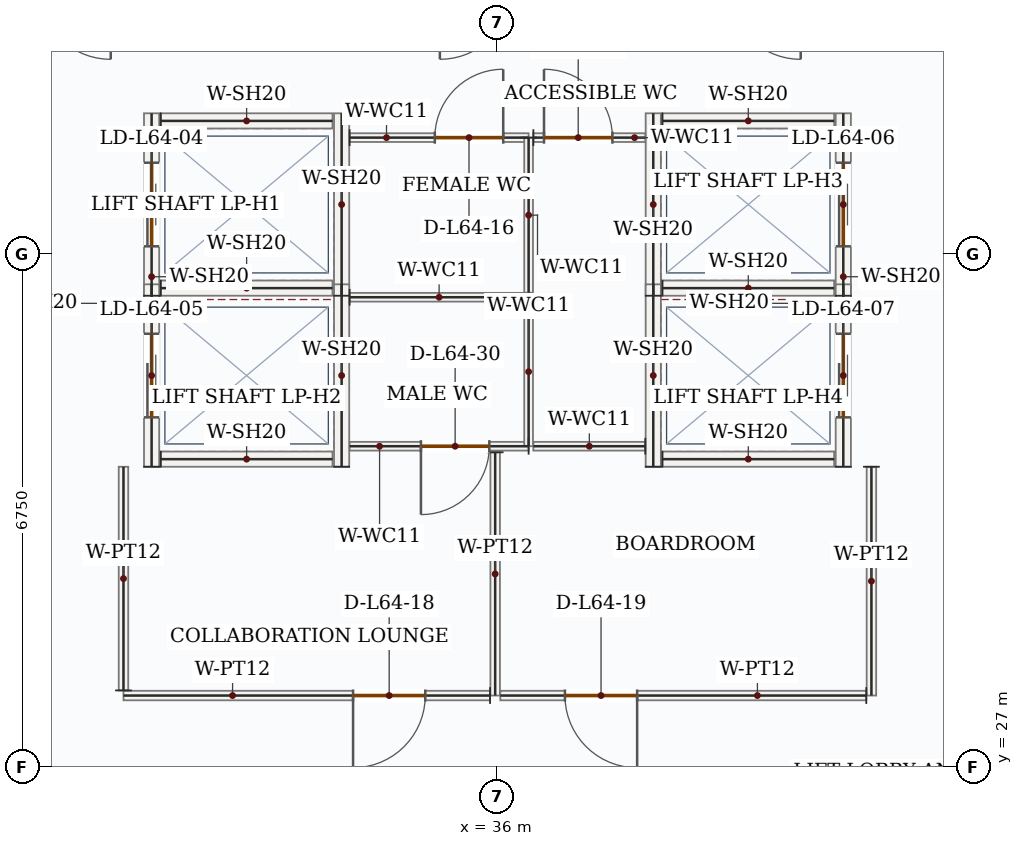
"""IFC4 building model, lengths in metres.
Left out: names, types, materials, properties, quantities, classifications, styles, units other than length and angle.
Written with IfcOpenShell. Run it as: python <this file> out.ifc"""

import sys

from ifc_helpers import new_model, si_unit, direction, frame, frame_2d, origin, place, context, subcontext, project, spatial, rectangle, extrude, source, transform, mapped, element, fill, save


model = new_model("IFC4")
c1 = context("Model", 3, precision=1e-05, world=origin(), true_north=direction((0.0, 1.0)))
c2 = subcontext(c1, "Body", "Model", "MODEL_VIEW")
j1 = project(units=[si_unit("LENGTHUNIT", "METRE"), si_unit("PLANEANGLEUNIT", "RADIAN")], contexts=[c1])
p1 = place(None, origin())
s1 = spatial("IfcSite", under=j1, at=p1, CompositionType="ELEMENT")
p2 = place(p1, origin())
s2 = spatial("IfcBuilding", under=s1, at=p2, CompositionType="ELEMENT")
p3 = place(p2, frame((0.0, 0.0, 269.1)))
s3 = spatial("IfcBuildingStorey", under=s2, at=p3, CompositionType="ELEMENT", Elevation=269.1)
p4 = place(p3, frame((31.45, 33.2, 0.0), z_axis=(0.0, 0.0, 1.0), x_axis=(0.0, 1.0, 0.0)))
e1 = element("IfcWall", 1, at=p4, inside=s3, PredefinedType="SOLIDWALL", context=c2, shape_type="SweptSolid", body=[
    extrude(rectangle(XDim=2.4, YDim=0.2, at=frame_2d((1.2, 0.0))), origin(), (0.0, 0.0, 1.0), 3.5),
])
p5 = place(p4, frame((0.65, 0.0, 0.0)))
e2 = element("IfcOpeningElement", 2, at=p5, cuts=e1, PredefinedType="OPENING", context=c2, shape_type="SweptSolid", body=[
    extrude(rectangle(XDim=1.1, YDim=2.15, at=frame_2d((0.55, 1.075))), frame((0.0, 0.11, 0.0), z_axis=(0.0, -1.0, 0.0), x_axis=(1.0, 0.0, 0.0)), (0.0, 0.0, 1.0), 0.22),
])
m1 = source(origin(), c2, "Body", "SweptSolid", [
    extrude(rectangle(XDim=2.4, YDim=0.2, at=frame_2d((1.2, 0.0))), origin(), (0.0, 0.0, 1.0), 3.5),
])
p6 = place(p3, frame((33.95, 33.2, 0.0), z_axis=(0.0, 0.0, 1.0), x_axis=(0.0, 1.0, 0.0)))
e3 = element("IfcWall", 3, at=p6, inside=s3, PredefinedType="SOLIDWALL", context=c2, shape_type="MappedRepresentation", body=[
    mapped(m1, transform((0.0, 0.0, 0.0), x_axis=(1.0, 0.0, 0.0), y_axis=(0.0, 1.0, 0.0), z_axis=(0.0, 0.0, 1.0), scale=1.0)),
])
m2 = source(origin(), c2, "Body", "SweptSolid", [
    extrude(rectangle(XDim=2.26, YDim=0.2, at=frame_2d((1.13, 0.0))), origin(), (0.0, 0.0, 1.0), 3.5),
])
for number, where, z_axis, x_axis in (
    (4, (31.57, 33.3, 0.0), (0.0, 0.0, 1.0), (1.0, 0.0, 0.0)),
    (5, (31.57, 35.5, 0.0), (0.0, 0.0, 1.0), (1.0, 0.0, 0.0)),
):
    element("IfcWall", number, at=place(p3, frame(where, z_axis=z_axis, x_axis=x_axis)), inside=s3, PredefinedType="SOLIDWALL", context=c2, shape_type="MappedRepresentation", body=[
        mapped(m2, transform((0.0, 0.0, 0.0), x_axis=(1.0, 0.0, 0.0), y_axis=(0.0, 1.0, 0.0), z_axis=(0.0, 0.0, 1.0), scale=1.0)),
    ])
p7 = place(p3, frame((31.45, 30.95, 0.0), z_axis=(0.0, 0.0, 1.0), x_axis=(0.0, 1.0, 0.0)))
e6 = element("IfcWall", 6, at=p7, inside=s3, PredefinedType="SOLIDWALL", context=c2, shape_type="SweptSolid", body=[
    extrude(rectangle(XDim=2.4, YDim=0.2, at=frame_2d((1.2, 0.0))), origin(), (0.0, 0.0, 1.0), 3.5),
])
p8 = place(p7, frame((0.65, 0.0, 0.0)))
e7 = element("IfcOpeningElement", 7, at=p8, cuts=e6, PredefinedType="OPENING", context=c2, shape_type="SweptSolid", body=[
    extrude(rectangle(XDim=1.1, YDim=2.15, at=frame_2d((0.55, 1.075))), frame((0.0, 0.11, 0.0), z_axis=(0.0, -1.0, 0.0), x_axis=(1.0, 0.0, 0.0)), (0.0, 0.0, 1.0), 0.22),
])
p9 = place(p3, frame((33.95, 30.95, 0.0), z_axis=(0.0, 0.0, 1.0), x_axis=(0.0, 1.0, 0.0)))
e8 = element("IfcWall", 8, at=p9, inside=s3, PredefinedType="SOLIDWALL", context=c2, shape_type="MappedRepresentation", body=[
    mapped(m1, transform((0.0, 0.0, 0.0), x_axis=(1.0, 0.0, 0.0), y_axis=(0.0, 1.0, 0.0), z_axis=(0.0, 0.0, 1.0), scale=1.0)),
])
p10 = place(p3, frame((31.57, 31.05, 0.0), z_axis=(0.0, 0.0, 1.0), x_axis=(1.0, 0.0, 0.0)))
e9 = element("IfcWall", 9, at=p10, inside=s3, PredefinedType="SOLIDWALL", context=c2, shape_type="MappedRepresentation", body=[
    mapped(m2, transform((0.0, 0.0, 0.0), x_axis=(1.0, 0.0, 0.0), y_axis=(0.0, 1.0, 0.0), z_axis=(0.0, 0.0, 1.0), scale=1.0)),
])
p11 = place(p3, frame((38.05, 33.2, 0.0), z_axis=(0.0, 0.0, 1.0), x_axis=(0.0, 1.0, 0.0)))
e10 = element("IfcWall", 10, at=p11, inside=s3, PredefinedType="SOLIDWALL", context=c2, shape_type="MappedRepresentation", body=[
    mapped(m1, transform((0.0, 0.0, 0.0), x_axis=(1.0, 0.0, 0.0), y_axis=(0.0, 1.0, 0.0), z_axis=(0.0, 0.0, 1.0), scale=1.0)),
])
p12 = place(p3, frame((40.55, 33.2, 0.0), z_axis=(0.0, 0.0, 1.0), x_axis=(0.0, 1.0, 0.0)))
e11 = element("IfcWall", 11, at=p12, inside=s3, PredefinedType="SOLIDWALL", context=c2, shape_type="SweptSolid", body=[
    extrude(rectangle(XDim=2.4, YDim=0.2, at=frame_2d((1.2, 0.0))), origin(), (0.0, 0.0, 1.0), 3.5),
])
p13 = place(p12, frame((0.65, 0.0, 0.0)))
e12 = element("IfcOpeningElement", 12, at=p13, cuts=e11, PredefinedType="OPENING", context=c2, shape_type="SweptSolid", body=[
    extrude(rectangle(XDim=1.1, YDim=2.15, at=frame_2d((0.55, 1.075))), frame((0.0, 0.11, 0.0), z_axis=(0.0, -1.0, 0.0), x_axis=(1.0, 0.0, 0.0)), (0.0, 0.0, 1.0), 0.22),
])
for number, where, z_axis, x_axis in (
    (13, (38.17, 33.3, 0.0), (0.0, 0.0, 1.0), (1.0, 0.0, 0.0)),
    (14, (38.17, 35.5, 0.0), (0.0, 0.0, 1.0), (1.0, 0.0, 0.0)),
):
    element("IfcWall", number, at=place(p3, frame(where, z_axis=z_axis, x_axis=x_axis)), inside=s3, PredefinedType="SOLIDWALL", context=c2, shape_type="MappedRepresentation", body=[
        mapped(m2, transform((0.0, 0.0, 0.0), x_axis=(1.0, 0.0, 0.0), y_axis=(0.0, 1.0, 0.0), z_axis=(0.0, 0.0, 1.0), scale=1.0)),
    ])
p14 = place(p3, frame((38.05, 30.95, 0.0), z_axis=(0.0, 0.0, 1.0), x_axis=(0.0, 1.0, 0.0)))
e15 = element("IfcWall", 15, at=p14, inside=s3, PredefinedType="SOLIDWALL", context=c2, shape_type="MappedRepresentation", body=[
    mapped(m1, transform((0.0, 0.0, 0.0), x_axis=(1.0, 0.0, 0.0), y_axis=(0.0, 1.0, 0.0), z_axis=(0.0, 0.0, 1.0), scale=1.0)),
])
p15 = place(p3, frame((40.55, 30.95, 0.0), z_axis=(0.0, 0.0, 1.0), x_axis=(0.0, 1.0, 0.0)))
e16 = element("IfcWall", 16, at=p15, inside=s3, PredefinedType="SOLIDWALL", context=c2, shape_type="SweptSolid", body=[
    extrude(rectangle(XDim=2.4, YDim=0.2, at=frame_2d((1.2, 0.0))), origin(), (0.0, 0.0, 1.0), 3.5),
])
p16 = place(p15, frame((0.65, 0.0, 0.0)))
e17 = element("IfcOpeningElement", 17, at=p16, cuts=e16, PredefinedType="OPENING", context=c2, shape_type="SweptSolid", body=[
    extrude(rectangle(XDim=1.1, YDim=2.15, at=frame_2d((0.55, 1.075))), frame((0.0, 0.11, 0.0), z_axis=(0.0, -1.0, 0.0), x_axis=(1.0, 0.0, 0.0)), (0.0, 0.0, 1.0), 0.22),
])
p17 = place(p3, frame((38.17, 31.05, 0.0), z_axis=(0.0, 0.0, 1.0), x_axis=(1.0, 0.0, 0.0)))
e18 = element("IfcWall", 18, at=p17, inside=s3, PredefinedType="SOLIDWALL", context=c2, shape_type="MappedRepresentation", body=[
    mapped(m2, transform((0.0, 0.0, 0.0), x_axis=(1.0, 0.0, 0.0), y_axis=(0.0, 1.0, 0.0), z_axis=(0.0, 0.0, 1.0), scale=1.0)),
])
p18 = place(p3, frame((36.41, 31.22, 0.0), z_axis=(0.0, 0.0, 1.0), x_axis=(-1.0, 0.0, 0.0)))
e19 = element("IfcWall", 19, at=p18, inside=s3, PredefinedType="PARTITIONING", context=c2, shape_type="SweptSolid", body=[
    extrude(rectangle(XDim=2.355, YDim=0.115, at=frame_2d((1.177, 0.0))), origin(), (0.0, 0.0, 1.0), 3.5),
])
p19 = place(p18, frame((0.517, 0.0, 0.0)))
e20 = element("IfcOpeningElement", 20, at=p19, cuts=e19, PredefinedType="OPENING", context=c2, shape_type="SweptSolid", body=[
    extrude(rectangle(XDim=0.9, YDim=2.1, at=frame_2d((0.45, 1.05))), frame((0.0, 0.067, 0.0), z_axis=(0.0, -1.0, 0.0), x_axis=(1.0, 0.0, 0.0)), (0.0, 0.0, 1.0), 0.135),
])
m3 = source(origin(), c2, "Body", "SweptSolid", [
    extrude(rectangle(XDim=2.355, YDim=0.115, at=frame_2d((1.177, 0.0))), origin(), (0.0, 0.0, 1.0), 3.5),
])
p20 = place(p3, frame((34.055, 33.18, 0.0), z_axis=(0.0, 0.0, 1.0), x_axis=(1.0, 0.0, 0.0)))
e21 = element("IfcWall", 21, at=p20, inside=s3, PredefinedType="PARTITIONING", context=c2, shape_type="MappedRepresentation", body=[
    mapped(m3, transform((0.0, 0.0, 0.0), x_axis=(1.0, 0.0, 0.0), y_axis=(0.0, 1.0, 0.0), z_axis=(0.0, 0.0, 1.0), scale=1.0)),
])
m4 = source(origin(), c2, "Body", "SweptSolid", [
    extrude(rectangle(XDim=1.96, YDim=0.115, at=frame_2d((0.98, 0.0))), origin(), (0.0, 0.0, 1.0), 3.5),
])
p21 = place(p3, frame((36.41, 33.18, 0.0), z_axis=(0.0, 0.0, 1.0), x_axis=(0.0, -1.0, 0.0)))
e22 = element("IfcWall", 22, at=p21, inside=s3, PredefinedType="PARTITIONING", context=c2, shape_type="MappedRepresentation", body=[
    mapped(m4, transform((0.0, 0.0, 0.0), x_axis=(1.0, 0.0, 0.0), y_axis=(0.0, 1.0, 0.0), z_axis=(0.0, 0.0, 1.0), scale=1.0)),
])
p22 = place(p3, frame((34.055, 35.28, 0.0), z_axis=(0.0, 0.0, 1.0), x_axis=(1.0, 0.0, 0.0)))
e23 = element("IfcWall", 23, at=p22, inside=s3, PredefinedType="PARTITIONING", context=c2, shape_type="SweptSolid", body=[
    extrude(rectangle(XDim=2.355, YDim=0.115, at=frame_2d((1.177, 0.0))), origin(), (0.0, 0.0, 1.0), 3.5),
])
p23 = place(p22, frame((1.121, 0.0, 0.0)))
e24 = element("IfcOpeningElement", 24, at=p23, cuts=e23, PredefinedType="OPENING", context=c2, shape_type="SweptSolid", body=[
    extrude(rectangle(XDim=0.9, YDim=2.1, at=frame_2d((0.45, 1.05))), frame((0.0, 0.067, 0.0), z_axis=(0.0, -1.0, 0.0), x_axis=(1.0, 0.0, 0.0)), (0.0, 0.0, 1.0), 0.135),
])
m5 = source(origin(), c2, "Body", "SweptSolid", [
    extrude(rectangle(XDim=2.04, YDim=0.115, at=frame_2d((1.02, 0.0))), origin(), (0.0, 0.0, 1.0), 3.5),
])
p24 = place(p3, frame((36.41, 35.28, 0.0), z_axis=(0.0, 0.0, 1.0), x_axis=(0.0, -1.0, 0.0)))
e25 = element("IfcWall", 25, at=p24, inside=s3, PredefinedType="PARTITIONING", context=c2, shape_type="MappedRepresentation", body=[
    mapped(m5, transform((0.0, 0.0, 0.0), x_axis=(1.0, 0.0, 0.0), y_axis=(0.0, 1.0, 0.0), z_axis=(0.0, 0.0, 1.0), scale=1.0)),
])
m6 = source(origin(), c2, "Body", "SweptSolid", [
    extrude(rectangle(XDim=1.473, YDim=0.115, at=frame_2d((0.736, 0.0))), origin(), (0.0, 0.0, 1.0), 3.5),
])
p25 = place(p3, frame((37.945, 31.22, 0.0), z_axis=(0.0, 0.0, 1.0), x_axis=(-1.0, 0.0, 0.0)))
e26 = element("IfcWall", 26, at=p25, inside=s3, PredefinedType="PARTITIONING", context=c2, shape_type="MappedRepresentation", body=[
    mapped(m6, transform((0.0, 0.0, 0.0), x_axis=(1.0, 0.0, 0.0), y_axis=(0.0, 1.0, 0.0), z_axis=(0.0, 0.0, 1.0), scale=1.0)),
])
p26 = place(p3, frame((36.472, 35.28, 0.0), z_axis=(0.0, 0.0, 1.0), x_axis=(1.0, 0.0, 0.0)))
e27 = element("IfcWall", 27, at=p26, inside=s3, PredefinedType="PARTITIONING", context=c2, shape_type="SweptSolid", body=[
    extrude(rectangle(XDim=1.473, YDim=0.115, at=frame_2d((0.736, 0.0))), origin(), (0.0, 0.0, 1.0), 3.5),
])
p27 = place(p26, frame((0.14, 0.0, 0.0)))
e28 = element("IfcOpeningElement", 28, at=p27, cuts=e27, PredefinedType="OPENING", context=c2, shape_type="SweptSolid", body=[
    extrude(rectangle(XDim=0.9, YDim=2.1, at=frame_2d((0.45, 1.05))), frame((0.0, 0.067, 0.0), z_axis=(0.0, -1.0, 0.0), x_axis=(1.0, 0.0, 0.0)), (0.0, 0.0, 1.0), 0.135),
])
m7 = source(origin(), c2, "Body", "SweptSolid", [
    extrude(rectangle(XDim=3.2, YDim=0.125, at=frame_2d((1.6, 0.0))), origin(), (0.0, 0.0, 1.0), 3.5),
])
p28 = place(p3, frame((35.97, 31.14, 0.0), z_axis=(0.0, 0.0, 1.0), x_axis=(0.0, -1.0, 0.0)))
e29 = element("IfcWall", 29, at=p28, inside=s3, PredefinedType="PARTITIONING", context=c2, shape_type="MappedRepresentation", body=[
    mapped(m7, transform((0.0, 0.0, 0.0), x_axis=(1.0, 0.0, 0.0), y_axis=(0.0, 1.0, 0.0), z_axis=(0.0, 0.0, 1.0), scale=1.0)),
])
p29 = place(p3, frame((35.903, 27.94, 0.0), z_axis=(0.0, 0.0, 1.0), x_axis=(-1.0, 0.0, 0.0)))
e30 = element("IfcWall", 30, at=p29, inside=s3, PredefinedType="PARTITIONING", context=c2, shape_type="SweptSolid", body=[
    extrude(rectangle(XDim=4.823, YDim=0.125, at=frame_2d((2.411, 0.0))), origin(), (0.0, 0.0, 1.0), 3.5),
])
p30 = place(p29, frame((0.852, 0.0, 0.0)))
e31 = element("IfcOpeningElement", 31, at=p30, cuts=e30, PredefinedType="OPENING", context=c2, shape_type="SweptSolid", body=[
    extrude(rectangle(XDim=0.95, YDim=2.15, at=frame_2d((0.475, 1.075))), frame((0.0, 0.073, 0.0), z_axis=(0.0, -1.0, 0.0), x_axis=(1.0, 0.0, 0.0)), (0.0, 0.0, 1.0), 0.145),
])
m8 = source(origin(), c2, "Body", "SweptSolid", [
    extrude(rectangle(XDim=2.942, YDim=0.125, at=frame_2d((1.471, 0.0))), origin(), (0.0, 0.0, 1.0), 3.5),
])
p31 = place(p3, frame((31.08, 28.008, 0.0), z_axis=(0.0, 0.0, 1.0), x_axis=(0.0, 1.0, 0.0)))
e32 = element("IfcWall", 32, at=p31, inside=s3, PredefinedType="PARTITIONING", context=c2, shape_type="MappedRepresentation", body=[
    mapped(m8, transform((0.0, 0.0, 0.0), x_axis=(1.0, 0.0, 0.0), y_axis=(0.0, 1.0, 0.0), z_axis=(0.0, 0.0, 1.0), scale=1.0)),
])
m9 = source(origin(), c2, "Body", "SweptSolid", [
    extrude(rectangle(XDim=3.01, YDim=0.125, at=frame_2d((1.505, 0.0))), origin(), (0.0, 0.0, 1.0), 3.5),
])
p32 = place(p3, frame((40.92, 30.95, 0.0), z_axis=(0.0, 0.0, 1.0), x_axis=(0.0, -1.0, 0.0)))
e33 = element("IfcWall", 33, at=p32, inside=s3, PredefinedType="PARTITIONING", context=c2, shape_type="MappedRepresentation", body=[
    mapped(m9, transform((0.0, 0.0, 0.0), x_axis=(1.0, 0.0, 0.0), y_axis=(0.0, 1.0, 0.0), z_axis=(0.0, 0.0, 1.0), scale=1.0)),
])
p33 = place(p3, frame((40.853, 27.94, 0.0), z_axis=(0.0, 0.0, 1.0), x_axis=(-1.0, 0.0, 0.0)))
e34 = element("IfcWall", 34, at=p33, inside=s3, PredefinedType="PARTITIONING", context=c2, shape_type="SweptSolid", body=[
    extrude(rectangle(XDim=4.815, YDim=0.125, at=frame_2d((2.407, 0.0))), origin(), (0.0, 0.0, 1.0), 3.5),
])
p34 = place(p33, frame((3.015, 0.0, 0.0)))
e35 = element("IfcOpeningElement", 35, at=p34, cuts=e34, PredefinedType="OPENING", context=c2, shape_type="SweptSolid", body=[
    extrude(rectangle(XDim=0.95, YDim=2.15, at=frame_2d((0.475, 1.075))), frame((0.0, 0.073, 0.0), z_axis=(0.0, -1.0, 0.0), x_axis=(1.0, 0.0, 0.0)), (0.0, 0.0, 1.0), 0.145),
])
m10 = source(origin(), c2, "Body", "SweptSolid", [
    extrude(rectangle(XDim=1.1, YDim=2.15, at=frame_2d((0.55, 1.075))), frame((0.0, 0.025, 0.0), z_axis=(0.0, -1.0, 0.0), x_axis=(1.0, 0.0, 0.0)), (0.0, 0.0, 1.0), 0.05),
])
p35 = place(p5, origin())
e36 = element("IfcDoor", 36, at=p35, inside=s3, OperationType="DOUBLE_DOOR_SLIDING", PredefinedType="DOOR", context=c2, shape_type="MappedRepresentation", body=[
    mapped(m10, transform((0.0, 0.0, 0.0), x_axis=(1.0, 0.0, 0.0), y_axis=(0.0, 1.0, 0.0), z_axis=(0.0, 0.0, 1.0), scale=1.0)),
])
fill(e2, e36)
p36 = place(p8, origin())
e37 = element("IfcDoor", 37, at=p36, inside=s3, OperationType="DOUBLE_DOOR_SLIDING", PredefinedType="DOOR", context=c2, shape_type="MappedRepresentation", body=[
    mapped(m10, transform((0.0, 0.0, 0.0), x_axis=(1.0, 0.0, 0.0), y_axis=(0.0, 1.0, 0.0), z_axis=(0.0, 0.0, 1.0), scale=1.0)),
])
fill(e7, e37)
p37 = place(p13, origin())
e38 = element("IfcDoor", 38, at=p37, inside=s3, OperationType="DOUBLE_DOOR_SLIDING", PredefinedType="DOOR", context=c2, shape_type="MappedRepresentation", body=[
    mapped(m10, transform((0.0, 0.0, 0.0), x_axis=(1.0, 0.0, 0.0), y_axis=(0.0, 1.0, 0.0), z_axis=(0.0, 0.0, 1.0), scale=1.0)),
])
fill(e12, e38)
p38 = place(p16, origin())
e39 = element("IfcDoor", 39, at=p38, inside=s3, OperationType="DOUBLE_DOOR_SLIDING", PredefinedType="DOOR", context=c2, shape_type="MappedRepresentation", body=[
    mapped(m10, transform((0.0, 0.0, 0.0), x_axis=(1.0, 0.0, 0.0), y_axis=(0.0, 1.0, 0.0), z_axis=(0.0, 0.0, 1.0), scale=1.0)),
])
fill(e17, e39)
m11 = source(origin(), c2, "Body", "SweptSolid", [
    extrude(rectangle(XDim=0.9, YDim=2.1, at=frame_2d((0.45, 1.05))), frame((0.0, 0.025, 0.0), z_axis=(0.0, -1.0, 0.0), x_axis=(1.0, 0.0, 0.0)), (0.0, 0.0, 1.0), 0.05),
])
p39 = place(p23, origin())
e40 = element("IfcDoor", 40, at=p39, inside=s3, OperationType="SINGLE_SWING_RIGHT", PredefinedType="DOOR", context=c2, shape_type="MappedRepresentation", body=[
    mapped(m11, transform((0.0, 0.0, 0.0), x_axis=(1.0, 0.0, 0.0), y_axis=(0.0, 1.0, 0.0), z_axis=(0.0, 0.0, 1.0), scale=1.0)),
])
fill(e24, e40)
p40 = place(p27, origin())
e41 = element("IfcDoor", 41, at=p40, inside=s3, OperationType="SINGLE_SWING_LEFT", PredefinedType="DOOR", context=c2, shape_type="MappedRepresentation", body=[
    mapped(m11, transform((0.0, 0.0, 0.0), x_axis=(1.0, 0.0, 0.0), y_axis=(0.0, 1.0, 0.0), z_axis=(0.0, 0.0, 1.0), scale=1.0)),
])
fill(e28, e41)
m12 = source(origin(), c2, "Body", "SweptSolid", [
    extrude(rectangle(XDim=0.95, YDim=2.15, at=frame_2d((0.475, 1.075))), frame((0.0, 0.025, 0.0), z_axis=(0.0, -1.0, 0.0), x_axis=(1.0, 0.0, 0.0)), (0.0, 0.0, 1.0), 0.05),
])
p41 = place(p30, origin())
e42 = element("IfcDoor", 42, at=p41, inside=s3, OperationType="SINGLE_SWING_RIGHT", PredefinedType="DOOR", context=c2, shape_type="MappedRepresentation", body=[
    mapped(m12, transform((0.0, 0.0, 0.0), x_axis=(1.0, 0.0, 0.0), y_axis=(0.0, 1.0, 0.0), z_axis=(0.0, 0.0, 1.0), scale=1.0)),
])
fill(e31, e42)
p42 = place(p34, origin())
e43 = element("IfcDoor", 43, at=p42, inside=s3, OperationType="SINGLE_SWING_LEFT", PredefinedType="DOOR", context=c2, shape_type="MappedRepresentation", body=[
    mapped(m12, transform((0.0, 0.0, 0.0), x_axis=(1.0, 0.0, 0.0), y_axis=(0.0, 1.0, 0.0), z_axis=(0.0, 0.0, 1.0), scale=1.0)),
])
fill(e35, e43)
p43 = place(p19, origin())
e44 = element("IfcDoor", 44, at=p43, inside=s3, OperationType="SINGLE_SWING_RIGHT", PredefinedType="DOOR", context=c2, shape_type="MappedRepresentation", body=[
    mapped(m11, transform((0.0, 0.0, 0.0), x_axis=(1.0, 0.0, 0.0), y_axis=(0.0, 1.0, 0.0), z_axis=(0.0, 0.0, 1.0), scale=1.0)),
])
fill(e20, e44)
save(model, sys.argv[1])
